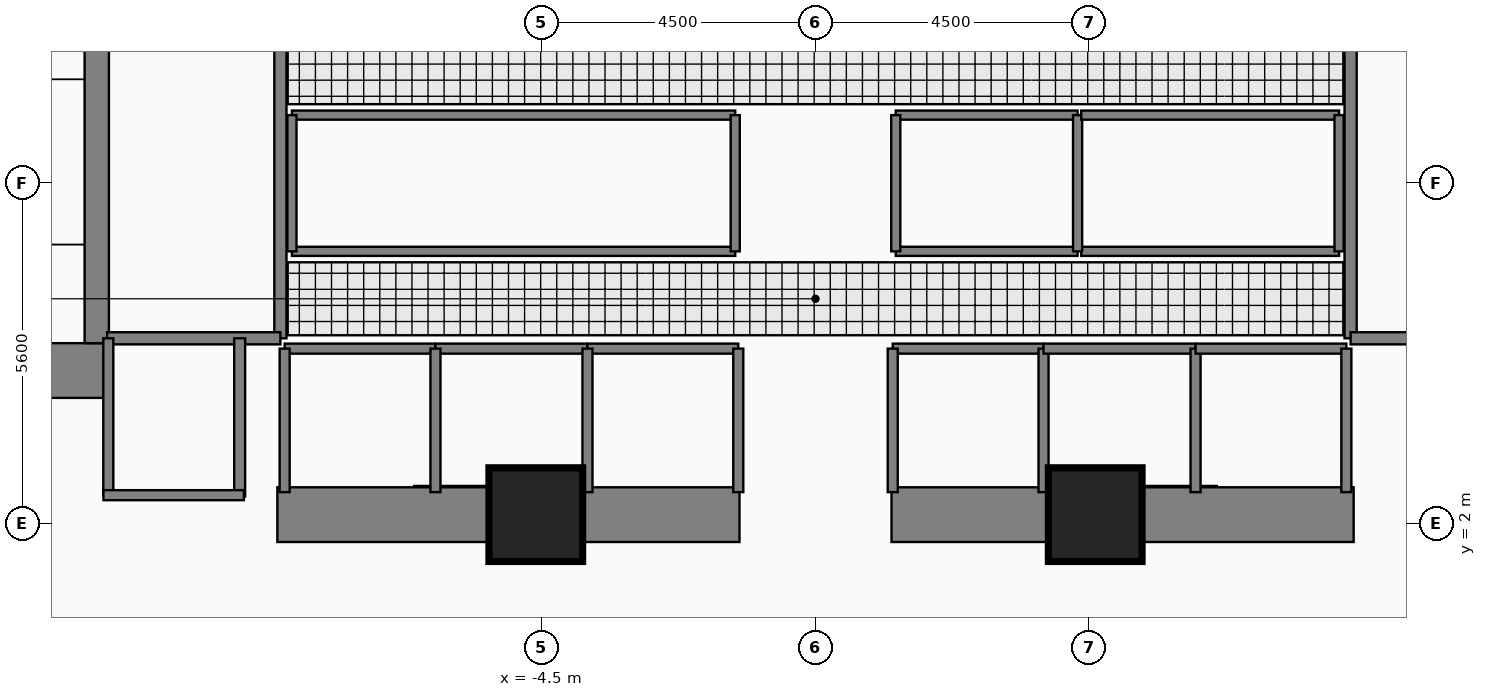
"""IFC4 building model, lengths in metres.
Left out: names, types, materials, properties, quantities, classifications, styles, units other than length and angle.
Written with IfcOpenShell. Run it as: python <this file> out.ifc"""

import sys

from ifc_helpers import new_model, si_unit, direction, frame, frame_2d, origin, origin_2d, place, context, subcontext, project, spatial, rectangle, extrude, element, fill, save


model = new_model("IFC4")
c1 = context("Model", 3, precision=1e-05, world=origin(), true_north=direction((0.0, 1.0)))
c2 = subcontext(c1, "Body", "Model", "MODEL_VIEW")
j1 = project(units=[si_unit("LENGTHUNIT", "METRE"), si_unit("PLANEANGLEUNIT", "RADIAN")], contexts=[c1])
p1 = place(None, origin())
s1 = spatial("IfcSite", under=j1, at=p1, CompositionType="ELEMENT")
p2 = place(p1, origin())
s2 = spatial("IfcBuilding", under=s1, at=p2, CompositionType="ELEMENT")
p3 = place(p2, frame((0.0, 0.0, 11.4)))
s3 = spatial("IfcBuildingStorey", under=s2, at=p3, CompositionType="ELEMENT", Elevation=11.4)
p4 = place(p3, frame((-16.31, 4.52, 0.0), z_axis=(0.0, 0.0, 1.0), x_axis=(1.0, 0.0, 0.0)))
e1 = element("IfcWall", 1, at=p4, inside=s3, PredefinedType="SHEAR", context=c2, shape_type="SweptSolid", body=[
    extrude(rectangle(XDim=4.71, YDim=0.9, at=frame_2d((2.355, 0.0))), origin(), (0.0, 0.0, 1.0), 6.41),
])
for number, where, z_axis, x_axis in (
    (2, (-8.85, 2.15, 0.0), (0.0, 0.0, 1.0), (1.0, 0.0, 0.0)),
    (3, (1.25, 2.15, 0.0), (0.0, 0.0, 1.0), (1.0, 0.0, 0.0)),
):
    element("IfcWall", number, at=place(p3, frame(where, z_axis=z_axis, x_axis=x_axis)), inside=s3, PredefinedType="SHEAR", context=c2, shape_type="SweptSolid", body=[
        extrude(rectangle(XDim=7.6, YDim=0.9, at=frame_2d((3.8, 0.0))), origin(), (0.0, 0.0, 1.0), 6.34),
    ])
p5 = place(p3, frame((-11.82, 4.97, 0.0), z_axis=(0.0, 0.0, 1.0), x_axis=(0.0, 1.0, 0.0)))
e4 = element("IfcWall", 4, at=p5, inside=s3, PredefinedType="SHEAR", context=c2, shape_type="SweptSolid", body=[
    extrude(rectangle(XDim=8.96, YDim=0.4, at=frame_2d((4.48, 0.0))), origin(), (0.0, 0.0, 1.0), 6.41),
])
p6 = place(p5, frame((0.31, 0.0, 0.0)))
e5 = element("IfcOpeningElement", 5, at=p6, cuts=e4, PredefinedType="OPENING", context=c2, shape_type="SweptSolid", body=[
    extrude(rectangle(XDim=1.12, YDim=2.22, at=frame_2d((0.56, 1.11))), frame((0.0, 0.21, 0.0), z_axis=(0.0, -1.0, 0.0), x_axis=(1.0, 0.0, 0.0)), (0.0, 0.0, 1.0), 0.42),
])
for number, where, z_axis, x_axis in (
    (6, (-4.6, 2.15, 0.0), (0.0, 0.0, 1.0), (1.0, 0.0, 0.0)),
    (7, (4.6, 2.15, 0.0), (0.0, 0.0, 1.0), (1.0, 0.0, 0.0)),
):
    element("IfcColumn", number, at=place(p3, frame(where, z_axis=z_axis, x_axis=x_axis)), inside=s3, PredefinedType="COLUMN", context=c2, shape_type="SweptSolid", body=[
        extrude(rectangle(XDim=1.5, YDim=1.5, at=origin_2d()), origin(), (0.0, 0.0, 1.0), 6.6),
    ])
p7 = place(p3, frame((-8.8, 5.05, 0.0), z_axis=(0.0, 0.0, 1.0), x_axis=(0.0, 1.0, 0.0)))
e8 = element("IfcWall", 8, at=p7, inside=s3, PredefinedType="PARTITIONING", context=c2, shape_type="SweptSolid", body=[
    extrude(rectangle(XDim=6.1, YDim=0.2, at=frame_2d((3.05, 0.0))), origin(), (0.0, 0.0, 1.0), 6.34),
])
p8 = place(p7, frame((0.25, 0.0, 0.0)))
e9 = element("IfcOpeningElement", 9, at=p8, cuts=e8, PredefinedType="OPENING", context=c2, shape_type="SweptSolid", body=[
    extrude(rectangle(XDim=1.1, YDim=2.2, at=frame_2d((0.55, 1.1))), frame((0.0, 0.11, 0.0), z_axis=(0.0, -1.0, 0.0), x_axis=(1.0, 0.0, 0.0)), (0.0, 0.0, 1.0), 0.22),
])
p9 = place(p7, frame((3.85, 0.0, 0.0)))
e10 = element("IfcOpeningElement", 10, at=p9, cuts=e8, PredefinedType="OPENING", context=c2, shape_type="SweptSolid", body=[
    extrude(rectangle(XDim=1.1, YDim=2.2, at=frame_2d((0.55, 1.1))), frame((0.0, 0.11, 0.0), z_axis=(0.0, -1.0, 0.0), x_axis=(1.0, 0.0, 0.0)), (0.0, 0.0, 1.0), 0.22),
])
p10 = place(p3, frame((8.8, 11.15, 0.0), z_axis=(0.0, 0.0, 1.0), x_axis=(0.0, -1.0, 0.0)))
e11 = element("IfcWall", 11, at=p10, inside=s3, PredefinedType="PARTITIONING", context=c2, shape_type="SweptSolid", body=[
    extrude(rectangle(XDim=6.1, YDim=0.2, at=frame_2d((3.05, 0.0))), origin(), (0.0, 0.0, 1.0), 6.34),
])
p11 = place(p10, frame((1.15, 0.0, 0.0)))
e12 = element("IfcOpeningElement", 12, at=p11, cuts=e11, PredefinedType="OPENING", context=c2, shape_type="SweptSolid", body=[
    extrude(rectangle(XDim=1.1, YDim=2.2, at=frame_2d((0.55, 1.1))), frame((0.0, 0.11, 0.0), z_axis=(0.0, -1.0, 0.0), x_axis=(1.0, 0.0, 0.0)), (0.0, 0.0, 1.0), 0.22),
])
p12 = place(p10, frame((4.75, 0.0, 0.0)))
e13 = element("IfcOpeningElement", 13, at=p12, cuts=e11, PredefinedType="OPENING", context=c2, shape_type="SweptSolid", body=[
    extrude(rectangle(XDim=1.1, YDim=2.2, at=frame_2d((0.55, 1.1))), frame((0.0, 0.11, 0.0), z_axis=(0.0, -1.0, 0.0), x_axis=(1.0, 0.0, 0.0)), (0.0, 0.0, 1.0), 0.22),
])
p13 = place(p3, frame((-8.73, 4.88, 0.0), z_axis=(0.0, 0.0, 1.0), x_axis=(1.0, 0.0, 0.0)))
e14 = element("IfcWall", 14, at=p13, inside=s3, PredefinedType="PARTITIONING", context=c2, shape_type="SweptSolid", body=[
    extrude(rectangle(XDim=2.48, YDim=0.165, at=frame_2d((1.24, 0.0))), origin(), (0.0, 0.0, 1.0), 6.34),
])
p14 = place(p13, frame((0.69, 0.0, 0.0)))
e15 = element("IfcOpeningElement", 15, at=p14, cuts=e14, PredefinedType="OPENING", context=c2, shape_type="SweptSolid", body=[
    extrude(rectangle(XDim=1.1, YDim=2.25, at=frame_2d((0.55, 1.125))), frame((0.0, 0.093, 0.0), z_axis=(0.0, -1.0, 0.0), x_axis=(1.0, 0.0, 0.0)), (0.0, 0.0, 1.0), 0.185),
])
p15 = place(p3, frame((-6.25, 4.88, 0.0), z_axis=(0.0, 0.0, 1.0), x_axis=(1.0, 0.0, 0.0)))
e16 = element("IfcWall", 16, at=p15, inside=s3, PredefinedType="PARTITIONING", context=c2, shape_type="SweptSolid", body=[
    extrude(rectangle(XDim=2.5, YDim=0.165, at=frame_2d((1.25, 0.0))), origin(), (0.0, 0.0, 1.0), 6.34),
])
p16 = place(p15, frame((0.7, 0.0, 0.0)))
e17 = element("IfcOpeningElement", 17, at=p16, cuts=e16, PredefinedType="OPENING", context=c2, shape_type="SweptSolid", body=[
    extrude(rectangle(XDim=1.1, YDim=2.25, at=frame_2d((0.55, 1.125))), frame((0.0, 0.093, 0.0), z_axis=(0.0, -1.0, 0.0), x_axis=(1.0, 0.0, 0.0)), (0.0, 0.0, 1.0), 0.185),
])
p17 = place(p3, frame((-3.75, 4.88, 0.0), z_axis=(0.0, 0.0, 1.0), x_axis=(1.0, 0.0, 0.0)))
e18 = element("IfcWall", 18, at=p17, inside=s3, PredefinedType="PARTITIONING", context=c2, shape_type="SweptSolid", body=[
    extrude(rectangle(XDim=2.48, YDim=0.165, at=frame_2d((1.24, 0.0))), origin(), (0.0, 0.0, 1.0), 6.34),
])
p18 = place(p17, frame((0.69, 0.0, 0.0)))
e19 = element("IfcOpeningElement", 19, at=p18, cuts=e18, PredefinedType="OPENING", context=c2, shape_type="SweptSolid", body=[
    extrude(rectangle(XDim=1.1, YDim=2.25, at=frame_2d((0.55, 1.125))), frame((0.0, 0.093, 0.0), z_axis=(0.0, -1.0, 0.0), x_axis=(1.0, 0.0, 0.0)), (0.0, 0.0, 1.0), 0.185),
])
p19 = place(p3, frame((1.27, 4.88, 0.0), z_axis=(0.0, 0.0, 1.0), x_axis=(1.0, 0.0, 0.0)))
e20 = element("IfcWall", 20, at=p19, inside=s3, PredefinedType="PARTITIONING", context=c2, shape_type="SweptSolid", body=[
    extrude(rectangle(XDim=2.48, YDim=0.165, at=frame_2d((1.24, 0.0))), origin(), (0.0, 0.0, 1.0), 6.34),
])
p20 = place(p19, frame((0.69, 0.0, 0.0)))
e21 = element("IfcOpeningElement", 21, at=p20, cuts=e20, PredefinedType="OPENING", context=c2, shape_type="SweptSolid", body=[
    extrude(rectangle(XDim=1.1, YDim=2.25, at=frame_2d((0.55, 1.125))), frame((0.0, 0.093, 0.0), z_axis=(0.0, -1.0, 0.0), x_axis=(1.0, 0.0, 0.0)), (0.0, 0.0, 1.0), 0.185),
])
p21 = place(p3, frame((-8.61, 6.48, 0.0), z_axis=(0.0, 0.0, 1.0), x_axis=(1.0, 0.0, 0.0)))
e22 = element("IfcWall", 22, at=p21, inside=s3, PredefinedType="PARTITIONING", context=c2, shape_type="SweptSolid", body=[
    extrude(rectangle(XDim=7.29, YDim=0.15, at=frame_2d((3.645, 0.0))), origin(), (0.0, 0.0, 1.0), 6.34),
])
p22 = place(p21, frame((3.195, 0.0, 0.0)))
e23 = element("IfcOpeningElement", 23, at=p22, cuts=e22, PredefinedType="OPENING", context=c2, shape_type="SweptSolid", body=[
    extrude(rectangle(XDim=0.9, YDim=2.15, at=frame_2d((0.45, 1.075))), frame((0.0, 0.085, 0.0), z_axis=(0.0, -1.0, 0.0), x_axis=(1.0, 0.0, 0.0)), (0.0, 0.0, 1.0), 0.17),
])
p23 = place(p3, frame((1.32, 8.72, 0.0), z_axis=(0.0, 0.0, 1.0), x_axis=(1.0, 0.0, 0.0)))
e24 = element("IfcWall", 24, at=p23, inside=s3, PredefinedType="PARTITIONING", context=c2, shape_type="SweptSolid", body=[
    extrude(rectangle(XDim=2.99, YDim=0.15, at=frame_2d((1.495, 0.0))), origin(), (0.0, 0.0, 1.0), 6.34),
])
p24 = place(p23, frame((1.045, 0.0, 0.0)))
e25 = element("IfcOpeningElement", 25, at=p24, cuts=e24, PredefinedType="OPENING", context=c2, shape_type="SweptSolid", body=[
    extrude(rectangle(XDim=0.9, YDim=2.15, at=frame_2d((0.45, 1.075))), frame((0.0, 0.085, 0.0), z_axis=(0.0, -1.0, 0.0), x_axis=(1.0, 0.0, 0.0)), (0.0, 0.0, 1.0), 0.17),
])
p25 = place(p3, frame((4.37, 6.48, 0.0), z_axis=(0.0, 0.0, 1.0), x_axis=(1.0, 0.0, 0.0)))
e26 = element("IfcWall", 26, at=p25, inside=s3, PredefinedType="PARTITIONING", context=c2, shape_type="SweptSolid", body=[
    extrude(rectangle(XDim=4.24, YDim=0.15, at=frame_2d((2.12, 0.0))), origin(), (0.0, 0.0, 1.0), 6.34),
])
p26 = place(p25, frame((1.67, 0.0, 0.0)))
e27 = element("IfcOpeningElement", 27, at=p26, cuts=e26, PredefinedType="OPENING", context=c2, shape_type="SweptSolid", body=[
    extrude(rectangle(XDim=0.9, YDim=2.15, at=frame_2d((0.45, 1.075))), frame((0.0, 0.085, 0.0), z_axis=(0.0, -1.0, 0.0), x_axis=(1.0, 0.0, 0.0)), (0.0, 0.0, 1.0), 0.17),
])
for number, where, z_axis, x_axis in (
    (28, (-11.65, 5.05, 0.0), (0.0, 0.0, 1.0), (1.0, 0.0, 0.0)),
    (29, (8.8, 5.05, 0.0), (0.0, 0.0, 1.0), (1.0, 0.0, 0.0)),
):
    element("IfcWall", number, at=place(p3, frame(where, z_axis=z_axis, x_axis=x_axis)), inside=s3, PredefinedType="PARTITIONING", context=c2, shape_type="SweptSolid", body=[
        extrude(rectangle(XDim=2.85, YDim=0.2, at=frame_2d((1.425, 0.0))), origin(), (0.0, 0.0, 1.0), 6.34),
    ])
for number, where, z_axis, x_axis in (
    (30, (-8.73, 2.52, 0.0), (0.0, 0.0, 1.0), (0.0, 1.0, 0.0)),
    (31, (-6.25, 2.52, 0.0), (0.0, 0.0, 1.0), (0.0, 1.0, 0.0)),
    (32, (-3.75, 2.52, 0.0), (0.0, 0.0, 1.0), (0.0, 1.0, 0.0)),
    (33, (-1.27, 2.52, 0.0), (0.0, 0.0, 1.0), (0.0, 1.0, 0.0)),
    (34, (1.27, 2.52, 0.0), (0.0, 0.0, 1.0), (0.0, 1.0, 0.0)),
    (35, (3.75, 2.52, 0.0), (0.0, 0.0, 1.0), (0.0, 1.0, 0.0)),
):
    element("IfcWall", number, at=place(p3, frame(where, z_axis=z_axis, x_axis=x_axis)), inside=s3, PredefinedType="PARTITIONING", context=c2, shape_type="SweptSolid", body=[
        extrude(rectangle(XDim=2.36, YDim=0.165, at=frame_2d((1.18, 0.0))), origin(), (0.0, 0.0, 1.0), 6.34),
    ])
p27 = place(p3, frame((3.75, 4.88, 0.0), z_axis=(0.0, 0.0, 1.0), x_axis=(1.0, 0.0, 0.0)))
e36 = element("IfcWall", 36, at=p27, inside=s3, PredefinedType="PARTITIONING", context=c2, shape_type="SweptSolid", body=[
    extrude(rectangle(XDim=2.5, YDim=0.165, at=frame_2d((1.25, 0.0))), origin(), (0.0, 0.0, 1.0), 6.34),
])
p28 = place(p3, frame((6.25, 2.52, 0.0), z_axis=(0.0, 0.0, 1.0), x_axis=(0.0, 1.0, 0.0)))
e37 = element("IfcWall", 37, at=p28, inside=s3, PredefinedType="PARTITIONING", context=c2, shape_type="SweptSolid", body=[
    extrude(rectangle(XDim=2.36, YDim=0.165, at=frame_2d((1.18, 0.0))), origin(), (0.0, 0.0, 1.0), 6.34),
])
p29 = place(p3, frame((6.25, 4.88, 0.0), z_axis=(0.0, 0.0, 1.0), x_axis=(1.0, 0.0, 0.0)))
e38 = element("IfcWall", 38, at=p29, inside=s3, PredefinedType="PARTITIONING", context=c2, shape_type="SweptSolid", body=[
    extrude(rectangle(XDim=2.48, YDim=0.165, at=frame_2d((1.24, 0.0))), origin(), (0.0, 0.0, 1.0), 6.34),
])
p30 = place(p3, frame((8.73, 2.52, 0.0), z_axis=(0.0, 0.0, 1.0), x_axis=(0.0, 1.0, 0.0)))
e39 = element("IfcWall", 39, at=p30, inside=s3, PredefinedType="PARTITIONING", context=c2, shape_type="SweptSolid", body=[
    extrude(rectangle(XDim=2.36, YDim=0.165, at=frame_2d((1.18, 0.0))), origin(), (0.0, 0.0, 1.0), 6.34),
])
p31 = place(p3, frame((-9.47, 2.45, 0.0), z_axis=(0.0, 0.0, 1.0), x_axis=(0.0, 1.0, 0.0)))
e40 = element("IfcWall", 40, at=p31, inside=s3, PredefinedType="PARTITIONING", context=c2, shape_type="SweptSolid", body=[
    extrude(rectangle(XDim=2.6, YDim=0.18, at=frame_2d((1.3, 0.0))), origin(), (0.0, 0.0, 1.0), 6.34),
])
p32 = place(p3, frame((-11.63, 2.47, 0.0), z_axis=(0.0, 0.0, 1.0), x_axis=(0.0, 1.0, 0.0)))
e41 = element("IfcWall", 41, at=p32, inside=s3, PredefinedType="PARTITIONING", context=c2, shape_type="SweptSolid", body=[
    extrude(rectangle(XDim=2.58, YDim=0.165, at=frame_2d((1.29, 0.0))), origin(), (0.0, 0.0, 1.0), 6.34),
])
p33 = place(p3, frame((-11.71, 2.47, 0.0), z_axis=(0.0, 0.0, 1.0), x_axis=(1.0, 0.0, 0.0)))
e42 = element("IfcWall", 42, at=p33, inside=s3, PredefinedType="PARTITIONING", context=c2, shape_type="SweptSolid", body=[
    extrude(rectangle(XDim=2.31, YDim=0.165, at=frame_2d((1.155, 0.0))), origin(), (0.0, 0.0, 1.0), 4.94),
])
p34 = place(p3, frame((-8.61, 8.72, 0.0), z_axis=(0.0, 0.0, 1.0), x_axis=(1.0, 0.0, 0.0)))
e43 = element("IfcWall", 43, at=p34, inside=s3, PredefinedType="PARTITIONING", context=c2, shape_type="SweptSolid", body=[
    extrude(rectangle(XDim=7.29, YDim=0.15, at=frame_2d((3.645, 0.0))), origin(), (0.0, 0.0, 1.0), 6.34),
])
for number, where, z_axis, x_axis in (
    (44, (-8.61, 6.48, 0.0), (0.0, 0.0, 1.0), (0.0, 1.0, 0.0)),
    (45, (-1.32, 6.48, 0.0), (0.0, 0.0, 1.0), (0.0, 1.0, 0.0)),
):
    element("IfcWall", number, at=place(p3, frame(where, z_axis=z_axis, x_axis=x_axis)), inside=s3, PredefinedType="PARTITIONING", context=c2, shape_type="SweptSolid", body=[
        extrude(rectangle(XDim=2.24, YDim=0.15, at=frame_2d((1.12, 0.0))), origin(), (0.0, 0.0, 1.0), 6.34),
    ])
p35 = place(p3, frame((1.32, 6.48, 0.0), z_axis=(0.0, 0.0, 1.0), x_axis=(1.0, 0.0, 0.0)))
e46 = element("IfcWall", 46, at=p35, inside=s3, PredefinedType="PARTITIONING", context=c2, shape_type="SweptSolid", body=[
    extrude(rectangle(XDim=2.99, YDim=0.15, at=frame_2d((1.495, 0.0))), origin(), (0.0, 0.0, 1.0), 6.34),
])
for number, where, z_axis, x_axis in (
    (47, (1.32, 6.48, 0.0), (0.0, 0.0, 1.0), (0.0, 1.0, 0.0)),
    (48, (4.31, 6.48, 0.0), (0.0, 0.0, 1.0), (0.0, 1.0, 0.0)),
):
    element("IfcWall", number, at=place(p3, frame(where, z_axis=z_axis, x_axis=x_axis)), inside=s3, PredefinedType="PARTITIONING", context=c2, shape_type="SweptSolid", body=[
        extrude(rectangle(XDim=2.24, YDim=0.15, at=frame_2d((1.12, 0.0))), origin(), (0.0, 0.0, 1.0), 6.34),
    ])
p36 = place(p3, frame((4.37, 8.72, 0.0), z_axis=(0.0, 0.0, 1.0), x_axis=(1.0, 0.0, 0.0)))
e49 = element("IfcWall", 49, at=p36, inside=s3, PredefinedType="PARTITIONING", context=c2, shape_type="SweptSolid", body=[
    extrude(rectangle(XDim=4.24, YDim=0.15, at=frame_2d((2.12, 0.0))), origin(), (0.0, 0.0, 1.0), 6.34),
])
p37 = place(p3, frame((8.61, 6.48, 0.0), z_axis=(0.0, 0.0, 1.0), x_axis=(0.0, 1.0, 0.0)))
e50 = element("IfcWall", 50, at=p37, inside=s3, PredefinedType="PARTITIONING", context=c2, shape_type="SweptSolid", body=[
    extrude(rectangle(XDim=2.24, YDim=0.15, at=frame_2d((1.12, 0.0))), origin(), (0.0, 0.0, 1.0), 6.34),
])
p38 = place(p6, origin())
e51 = element("IfcDoor", 51, at=p38, inside=s3, OperationType="SINGLE_SWING_LEFT", PredefinedType="DOOR", context=c2, shape_type="SweptSolid", body=[
    extrude(rectangle(XDim=1.12, YDim=2.22, at=frame_2d((0.56, 1.11))), frame((0.0, 0.025, 0.0), z_axis=(0.0, -1.0, 0.0), x_axis=(1.0, 0.0, 0.0)), (0.0, 0.0, 1.0), 0.05),
])
fill(e5, e51)
p39 = place(p8, origin())
e52 = element("IfcDoor", 52, at=p39, inside=s3, OperationType="SINGLE_SWING_RIGHT", PredefinedType="DOOR", context=c2, shape_type="SweptSolid", body=[
    extrude(rectangle(XDim=1.1, YDim=2.2, at=frame_2d((0.55, 1.1))), frame((0.0, 0.025, 0.0), z_axis=(0.0, -1.0, 0.0), x_axis=(1.0, 0.0, 0.0)), (0.0, 0.0, 1.0), 0.05),
])
fill(e9, e52)
p40 = place(p9, origin())
e53 = element("IfcDoor", 53, at=p40, inside=s3, OperationType="SINGLE_SWING_LEFT", PredefinedType="DOOR", context=c2, shape_type="SweptSolid", body=[
    extrude(rectangle(XDim=1.1, YDim=2.2, at=frame_2d((0.55, 1.1))), frame((0.0, 0.025, 0.0), z_axis=(0.0, -1.0, 0.0), x_axis=(1.0, 0.0, 0.0)), (0.0, 0.0, 1.0), 0.05),
])
fill(e10, e53)
p41 = place(p11, origin())
e54 = element("IfcDoor", 54, at=p41, inside=s3, OperationType="SINGLE_SWING_RIGHT", PredefinedType="DOOR", context=c2, shape_type="SweptSolid", body=[
    extrude(rectangle(XDim=1.1, YDim=2.2, at=frame_2d((0.55, 1.1))), frame((0.0, 0.025, 0.0), z_axis=(0.0, -1.0, 0.0), x_axis=(1.0, 0.0, 0.0)), (0.0, 0.0, 1.0), 0.05),
])
fill(e12, e54)
p42 = place(p12, origin())
e55 = element("IfcDoor", 55, at=p42, inside=s3, OperationType="SINGLE_SWING_LEFT", PredefinedType="DOOR", context=c2, shape_type="SweptSolid", body=[
    extrude(rectangle(XDim=1.1, YDim=2.2, at=frame_2d((0.55, 1.1))), frame((0.0, 0.025, 0.0), z_axis=(0.0, -1.0, 0.0), x_axis=(1.0, 0.0, 0.0)), (0.0, 0.0, 1.0), 0.05),
])
fill(e13, e55)
p43 = place(p14, origin())
e56 = element("IfcDoor", 56, at=p43, inside=s3, OperationType="SLIDING_TO_LEFT", PredefinedType="DOOR", context=c2, shape_type="SweptSolid", body=[
    extrude(rectangle(XDim=1.1, YDim=2.25, at=frame_2d((0.55, 1.125))), frame((0.0, 0.025, 0.0), z_axis=(0.0, -1.0, 0.0), x_axis=(1.0, 0.0, 0.0)), (0.0, 0.0, 1.0), 0.05),
])
fill(e15, e56)
p44 = place(p16, origin())
e57 = element("IfcDoor", 57, at=p44, inside=s3, OperationType="SLIDING_TO_LEFT", PredefinedType="DOOR", context=c2, shape_type="SweptSolid", body=[
    extrude(rectangle(XDim=1.1, YDim=2.25, at=frame_2d((0.55, 1.125))), frame((0.0, 0.025, 0.0), z_axis=(0.0, -1.0, 0.0), x_axis=(1.0, 0.0, 0.0)), (0.0, 0.0, 1.0), 0.05),
])
fill(e17, e57)
p45 = place(p18, origin())
e58 = element("IfcDoor", 58, at=p45, inside=s3, OperationType="SLIDING_TO_LEFT", PredefinedType="DOOR", context=c2, shape_type="SweptSolid", body=[
    extrude(rectangle(XDim=1.1, YDim=2.25, at=frame_2d((0.55, 1.125))), frame((0.0, 0.025, 0.0), z_axis=(0.0, -1.0, 0.0), x_axis=(1.0, 0.0, 0.0)), (0.0, 0.0, 1.0), 0.05),
])
fill(e19, e58)
p46 = place(p20, origin())
e59 = element("IfcDoor", 59, at=p46, inside=s3, OperationType="SLIDING_TO_LEFT", PredefinedType="DOOR", context=c2, shape_type="SweptSolid", body=[
    extrude(rectangle(XDim=1.1, YDim=2.25, at=frame_2d((0.55, 1.125))), frame((0.0, 0.025, 0.0), z_axis=(0.0, -1.0, 0.0), x_axis=(1.0, 0.0, 0.0)), (0.0, 0.0, 1.0), 0.05),
])
fill(e21, e59)
p47 = place(p22, origin())
e60 = element("IfcDoor", 60, at=p47, inside=s3, OperationType="SINGLE_SWING_RIGHT", PredefinedType="DOOR", context=c2, shape_type="SweptSolid", body=[
    extrude(rectangle(XDim=0.9, YDim=2.15, at=frame_2d((0.45, 1.075))), frame((0.0, 0.025, 0.0), z_axis=(0.0, -1.0, 0.0), x_axis=(1.0, 0.0, 0.0)), (0.0, 0.0, 1.0), 0.05),
])
fill(e23, e60)
p48 = place(p24, origin())
e61 = element("IfcDoor", 61, at=p48, inside=s3, OperationType="SINGLE_SWING_LEFT", PredefinedType="DOOR", context=c2, shape_type="SweptSolid", body=[
    extrude(rectangle(XDim=0.9, YDim=2.15, at=frame_2d((0.45, 1.075))), frame((0.0, 0.025, 0.0), z_axis=(0.0, -1.0, 0.0), x_axis=(1.0, 0.0, 0.0)), (0.0, 0.0, 1.0), 0.05),
])
fill(e25, e61)
p49 = place(p26, origin())
e62 = element("IfcDoor", 62, at=p49, inside=s3, OperationType="SINGLE_SWING_RIGHT", PredefinedType="DOOR", context=c2, shape_type="SweptSolid", body=[
    extrude(rectangle(XDim=0.9, YDim=2.15, at=frame_2d((0.45, 1.075))), frame((0.0, 0.025, 0.0), z_axis=(0.0, -1.0, 0.0), x_axis=(1.0, 0.0, 0.0)), (0.0, 0.0, 1.0), 0.05),
])
fill(e27, e62)
save(model, sys.argv[1])
